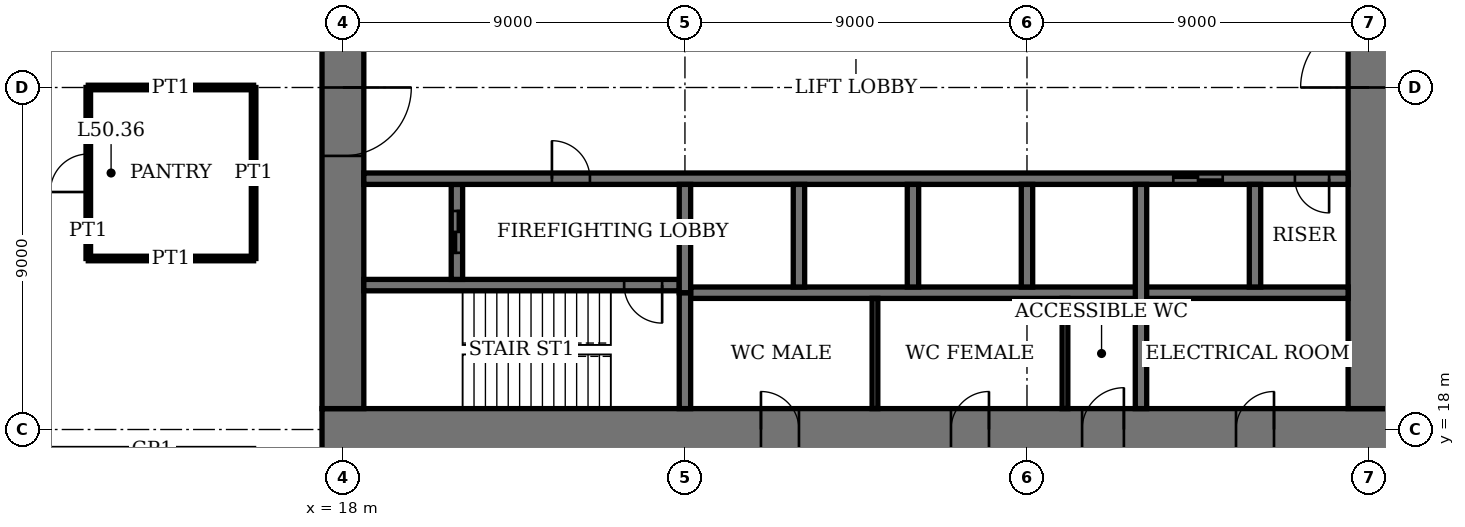
"""IFC4 building model, lengths in metres.
Left out: names, types, materials, properties, quantities, classifications, styles, units other than length and angle.
Written with IfcOpenShell. Run it as: python <this file> out.ifc"""

import sys

from ifc_helpers import new_model, si_unit, direction, frame, frame_2d, origin, place, context, subcontext, project, spatial, rectangle, extrude, element, fill, save


model = new_model("IFC4")
c1 = context("Model", 3, precision=1e-05, world=origin(), true_north=direction((0.0, 1.0)))
c2 = subcontext(c1, "Body", "Model", "MODEL_VIEW")
j1 = project(units=[si_unit("LENGTHUNIT", "METRE"), si_unit("PLANEANGLEUNIT", "RADIAN")], contexts=[c1])
p1 = place(None, origin())
s1 = spatial("IfcSite", under=j1, at=p1, CompositionType="ELEMENT")
p2 = place(p1, origin())
s2 = spatial("IfcBuilding", under=s1, at=p2, CompositionType="ELEMENT")
p3 = place(p2, frame((0.0, 0.0, 206.2)))
s3 = spatial("IfcBuildingStorey", under=s2, at=p3, CompositionType="ELEMENT", Elevation=206.2)
p4 = place(p3, frame((17.45, 18.0, 0.0), z_axis=(0.0, 0.0, 1.0), x_axis=(1.0, 0.0, 0.0)))
e1 = element("IfcWall", 1, at=p4, inside=s3, PredefinedType="SHEAR", context=c2, shape_type="SweptSolid", body=[
    extrude(rectangle(XDim=28.1, YDim=1.1, at=frame_2d((14.05, 0.0))), origin(), (0.0, 0.0, 1.0), 4.0),
])
p5 = place(p4, frame((11.55, 0.0, 0.0)))
e2 = element("IfcOpeningElement", 2, at=p5, cuts=e1, PredefinedType="OPENING", context=c2, shape_type="SweptSolid", body=[
    extrude(rectangle(XDim=1.0, YDim=2.4, at=frame_2d((0.5, 1.2))), frame((0.0, 0.56, 0.0), z_axis=(0.0, -1.0, 0.0), x_axis=(1.0, 0.0, 0.0)), (0.0, 0.0, 1.0), 1.12),
])
p6 = place(p4, frame((16.55, 0.0, 0.0)))
e3 = element("IfcOpeningElement", 3, at=p6, cuts=e1, PredefinedType="OPENING", context=c2, shape_type="SweptSolid", body=[
    extrude(rectangle(XDim=1.0, YDim=2.4, at=frame_2d((0.5, 1.2))), frame((0.0, 0.56, 0.0), z_axis=(0.0, -1.0, 0.0), x_axis=(1.0, 0.0, 0.0)), (0.0, 0.0, 1.0), 1.12),
])
p7 = place(p4, frame((20.0, 0.0, 0.0)))
e4 = element("IfcOpeningElement", 4, at=p7, cuts=e1, PredefinedType="OPENING", context=c2, shape_type="SweptSolid", body=[
    extrude(rectangle(XDim=1.1, YDim=2.4, at=frame_2d((0.55, 1.2))), frame((0.0, 0.56, 0.0), z_axis=(0.0, -1.0, 0.0), x_axis=(1.0, 0.0, 0.0)), (0.0, 0.0, 1.0), 1.12),
])
p8 = place(p4, frame((24.05, 0.0, 0.0)))
e5 = element("IfcOpeningElement", 5, at=p8, cuts=e1, PredefinedType="OPENING", context=c2, shape_type="SweptSolid", body=[
    extrude(rectangle(XDim=1.0, YDim=2.4, at=frame_2d((0.5, 1.2))), frame((0.0, 0.56, 0.0), z_axis=(0.0, -1.0, 0.0), x_axis=(1.0, 0.0, 0.0)), (0.0, 0.0, 1.0), 1.12),
])
p9 = place(p3, frame((18.0, 35.45, 0.0), z_axis=(0.0, 0.0, 1.0), x_axis=(0.0, -1.0, 0.0)))
e6 = element("IfcWall", 6, at=p9, inside=s3, PredefinedType="SHEAR", context=c2, shape_type="SweptSolid", body=[
    extrude(rectangle(XDim=16.9, YDim=1.1, at=frame_2d((8.45, 0.0))), origin(), (0.0, 0.0, 1.0), 4.0),
])
p10 = place(p9, frame((8.45, 0.0, 0.0)))
e7 = element("IfcOpeningElement", 7, at=p10, cuts=e6, PredefinedType="OPENING", context=c2, shape_type="SweptSolid", body=[
    extrude(rectangle(XDim=1.8, YDim=2.4, at=frame_2d((0.9, 1.2))), frame((0.0, 0.56, 0.0), z_axis=(0.0, -1.0, 0.0), x_axis=(1.0, 0.0, 0.0)), (0.0, 0.0, 1.0), 1.12),
])
p11 = place(p3, frame((45.0, 18.55, 0.0), z_axis=(0.0, 0.0, 1.0), x_axis=(0.0, 1.0, 0.0)))
e8 = element("IfcWall", 8, at=p11, inside=s3, PredefinedType="SHEAR", context=c2, shape_type="SweptSolid", body=[
    extrude(rectangle(XDim=16.9, YDim=1.1, at=frame_2d((8.45, 0.0))), origin(), (0.0, 0.0, 1.0), 4.0),
])
p12 = place(p11, frame((8.45, 0.0, 0.0)))
e9 = element("IfcOpeningElement", 9, at=p12, cuts=e8, PredefinedType="OPENING", context=c2, shape_type="SweptSolid", body=[
    extrude(rectangle(XDim=1.8, YDim=2.4, at=frame_2d((0.9, 1.2))), frame((0.0, 0.56, 0.0), z_axis=(0.0, -1.0, 0.0), x_axis=(1.0, 0.0, 0.0)), (0.0, 0.0, 1.0), 1.12),
])
p13 = place(p3, frame((18.55, 21.8, 0.0), z_axis=(0.0, 0.0, 1.0), x_axis=(1.0, 0.0, 0.0)))
e10 = element("IfcWall", 10, at=p13, inside=s3, PredefinedType="SHEAR", context=c2, shape_type="SweptSolid", body=[
    extrude(rectangle(XDim=8.3, YDim=0.3, at=frame_2d((4.15, 0.0))), origin(), (0.0, 0.0, 1.0), 4.0),
])
p14 = place(p13, frame((6.85, 0.0, 0.0)))
e11 = element("IfcOpeningElement", 11, at=p14, cuts=e10, PredefinedType="OPENING", context=c2, shape_type="SweptSolid", body=[
    extrude(rectangle(XDim=1.0, YDim=2.4, at=frame_2d((0.5, 1.2))), frame((0.0, 0.16, 0.0), z_axis=(0.0, -1.0, 0.0), x_axis=(1.0, 0.0, 0.0)), (0.0, 0.0, 1.0), 0.32),
])
p15 = place(p3, frame((27.0, 18.55, 0.0), z_axis=(0.0, 0.0, 1.0), x_axis=(0.0, 1.0, 0.0)))
e12 = element("IfcWall", 12, at=p15, inside=s3, PredefinedType="SHEAR", context=c2, shape_type="SweptSolid", body=[
    extrude(rectangle(XDim=3.05, YDim=0.3, at=frame_2d((1.525, 0.0))), origin(), (0.0, 0.0, 1.0), 4.0),
])
p16 = place(p3, frame((21.0, 21.95, 0.0), z_axis=(0.0, 0.0, 1.0), x_axis=(0.0, 1.0, 0.0)))
e13 = element("IfcWall", 13, at=p16, inside=s3, PredefinedType="SHEAR", context=c2, shape_type="SweptSolid", body=[
    extrude(rectangle(XDim=2.5, YDim=0.3, at=frame_2d((1.25, 0.0))), origin(), (0.0, 0.0, 1.0), 4.0),
])
p17 = place(p16, frame((0.7, 0.0, 0.0)))
e14 = element("IfcOpeningElement", 14, at=p17, cuts=e13, PredefinedType="OPENING", context=c2, shape_type="SweptSolid", body=[
    extrude(rectangle(XDim=1.1, YDim=2.4, at=frame_2d((0.55, 1.2))), frame((0.0, 0.16, 0.0), z_axis=(0.0, -1.0, 0.0), x_axis=(1.0, 0.0, 0.0)), (0.0, 0.0, 1.0), 0.32),
])
p18 = place(p3, frame((18.55, 24.6, 0.0), z_axis=(0.0, 0.0, 1.0), x_axis=(1.0, 0.0, 0.0)))
e15 = element("IfcWall", 15, at=p18, inside=s3, PredefinedType="SHEAR", context=c2, shape_type="SweptSolid", body=[
    extrude(rectangle(XDim=25.9, YDim=0.3, at=frame_2d((12.95, 0.0))), origin(), (0.0, 0.0, 1.0), 4.0),
])
p19 = place(p18, frame((4.95, 0.0, 0.0)))
e16 = element("IfcOpeningElement", 16, at=p19, cuts=e15, PredefinedType="OPENING", context=c2, shape_type="SweptSolid", body=[
    extrude(rectangle(XDim=1.0, YDim=2.4, at=frame_2d((0.5, 1.2))), frame((0.0, 0.16, 0.0), z_axis=(0.0, -1.0, 0.0), x_axis=(1.0, 0.0, 0.0)), (0.0, 0.0, 1.0), 0.32),
])
p20 = place(p18, frame((24.5, 0.0, 0.0)))
e17 = element("IfcOpeningElement", 17, at=p20, cuts=e15, PredefinedType="OPENING", context=c2, shape_type="SweptSolid", body=[
    extrude(rectangle(XDim=0.9, YDim=2.1, at=frame_2d((0.45, 1.05))), frame((0.0, 0.16, 0.0), z_axis=(0.0, -1.0, 0.0), x_axis=(1.0, 0.0, 0.0)), (0.0, 0.0, 1.0), 0.32),
])
p21 = place(p18, frame((21.3, 0.0, 0.0)))
e18 = element("IfcOpeningElement", 18, at=p21, cuts=e15, PredefinedType="OPENING", context=c2, shape_type="SweptSolid", body=[
    extrude(rectangle(XDim=1.3, YDim=2.4, at=frame_2d((0.65, 1.2))), frame((0.0, 0.16, 0.0), z_axis=(0.0, -1.0, 0.0), x_axis=(1.0, 0.0, 0.0)), (0.0, 0.0, 1.0), 0.32),
])
p22 = place(p3, frame((27.15, 21.6, 0.0), z_axis=(0.0, 0.0, 1.0), x_axis=(1.0, 0.0, 0.0)))
e19 = element("IfcWall", 19, at=p22, inside=s3, PredefinedType="SHEAR", context=c2, shape_type="SweptSolid", body=[
    extrude(rectangle(XDim=17.3, YDim=0.3, at=frame_2d((8.65, 0.0))), origin(), (0.0, 0.0, 1.0), 4.0),
])
for number, where, z_axis, x_axis in (
    (20, (30.0, 21.75, 0.0), (0.0, 0.0, 1.0), (0.0, 1.0, 0.0)),
    (21, (33.0, 21.75, 0.0), (0.0, 0.0, 1.0), (0.0, 1.0, 0.0)),
    (22, (36.0, 21.75, 0.0), (0.0, 0.0, 1.0), (0.0, 1.0, 0.0)),
):
    element("IfcWall", number, at=place(p3, frame(where, z_axis=z_axis, x_axis=x_axis)), inside=s3, PredefinedType="SHEAR", context=c2, shape_type="SweptSolid", body=[
        extrude(rectangle(XDim=2.7, YDim=0.3, at=frame_2d((1.35, 0.0))), origin(), (0.0, 0.0, 1.0), 4.0),
    ])
p23 = place(p3, frame((39.0, 18.55, 0.0), z_axis=(0.0, 0.0, 1.0), x_axis=(0.0, 1.0, 0.0)))
e23 = element("IfcWall", 23, at=p23, inside=s3, PredefinedType="SHEAR", context=c2, shape_type="SweptSolid", body=[
    extrude(rectangle(XDim=5.9, YDim=0.3, at=frame_2d((2.95, 0.0))), origin(), (0.0, 0.0, 1.0), 4.0),
])
p24 = place(p3, frame((42.0, 21.75, 0.0), z_axis=(0.0, 0.0, 1.0), x_axis=(0.0, 1.0, 0.0)))
e24 = element("IfcWall", 24, at=p24, inside=s3, PredefinedType="SHEAR", context=c2, shape_type="SweptSolid", body=[
    extrude(rectangle(XDim=2.7, YDim=0.3, at=frame_2d((1.35, 0.0))), origin(), (0.0, 0.0, 1.0), 4.0),
])
p25 = place(p3, frame((27.0, 21.6, 0.0), z_axis=(0.0, 0.0, 1.0), x_axis=(0.0, 1.0, 0.0)))
e25 = element("IfcWall", 25, at=p25, inside=s3, PredefinedType="SHEAR", context=c2, shape_type="SweptSolid", body=[
    extrude(rectangle(XDim=2.85, YDim=0.3, at=frame_2d((1.425, 0.0))), origin(), (0.0, 0.0, 1.0), 4.0),
])
p26 = place(p3, frame((11.3, 22.5, 0.0), z_axis=(0.0, 0.0, 1.0), x_axis=(1.0, 0.0, 0.0)))
e26 = element("IfcWall", 26, at=p26, inside=s3, PredefinedType="PARTITIONING", context=c2, shape_type="SweptSolid", body=[
    extrude(rectangle(XDim=4.35, YDim=0.12, at=frame_2d((2.175, 0.0))), origin(), (0.0, 0.0, 1.0), 3.1),
])
p27 = place(p3, frame((11.3, 27.0, 0.0), z_axis=(0.0, 0.0, 1.0), x_axis=(1.0, 0.0, 0.0)))
e27 = element("IfcWall", 27, at=p27, inside=s3, PredefinedType="PARTITIONING", context=c2, shape_type="SweptSolid", body=[
    extrude(rectangle(XDim=4.35, YDim=0.12, at=frame_2d((2.175, 0.0))), origin(), (0.0, 0.0, 1.0), 3.05),
])
p28 = place(p3, frame((11.3, 22.5, 0.0), z_axis=(0.0, 0.0, 1.0), x_axis=(0.0, 1.0, 0.0)))
e28 = element("IfcWall", 28, at=p28, inside=s3, PredefinedType="PARTITIONING", context=c2, shape_type="SweptSolid", body=[
    extrude(rectangle(XDim=4.5, YDim=0.12, at=frame_2d((2.25, 0.0))), origin(), (0.0, 0.0, 1.0), 3.75),
])
p29 = place(p28, frame((1.75, 0.0, 0.0)))
e29 = element("IfcOpeningElement", 29, at=p29, cuts=e28, PredefinedType="OPENING", context=c2, shape_type="SweptSolid", body=[
    extrude(rectangle(XDim=1.0, YDim=2.4, at=frame_2d((0.5, 1.2))), frame((0.0, 0.07, 0.0), z_axis=(0.0, -1.0, 0.0), x_axis=(1.0, 0.0, 0.0)), (0.0, 0.0, 1.0), 0.14),
])
p30 = place(p3, frame((15.65, 22.5, 0.0), z_axis=(0.0, 0.0, 1.0), x_axis=(0.0, 1.0, 0.0)))
e30 = element("IfcWall", 30, at=p30, inside=s3, PredefinedType="PARTITIONING", context=c2, shape_type="SweptSolid", body=[
    extrude(rectangle(XDim=4.5, YDim=0.12, at=frame_2d((2.25, 0.0))), origin(), (0.0, 0.0, 1.0), 3.75),
])
for number, where, z_axis, x_axis in (
    (31, (32.0, 18.55, 0.0), (0.0, 0.0, 1.0), (0.0, 1.0, 0.0)),
    (32, (37.0, 18.55, 0.0), (0.0, 0.0, 1.0), (0.0, 1.0, 0.0)),
):
    element("IfcWall", number, at=place(p3, frame(where, z_axis=z_axis, x_axis=x_axis)), inside=s3, PredefinedType="PARTITIONING", context=c2, shape_type="SweptSolid", body=[
        extrude(rectangle(XDim=2.9, YDim=0.15, at=frame_2d((1.45, 0.0))), origin(), (0.0, 0.0, 1.0), 3.75),
    ])
p31 = place(p10, origin())
e33 = element("IfcDoor", 33, at=p31, inside=s3, OperationType="DOUBLE_DOOR_DOUBLE_SWING", PredefinedType="DOOR", context=c2, shape_type="SweptSolid", body=[
    extrude(rectangle(XDim=1.8, YDim=2.4, at=frame_2d((0.9, 1.2))), frame((0.0, 0.03, 0.0), z_axis=(0.0, -1.0, 0.0), x_axis=(1.0, 0.0, 0.0)), (0.0, 0.0, 1.0), 0.06),
    extrude(rectangle(XDim=0.04, YDim=2.4, at=frame_2d((0.02, 1.2))), frame((0.0, 0.55, 0.0), z_axis=(0.0, -1.0, 0.0), x_axis=(1.0, 0.0, 0.0)), (0.0, 0.0, 1.0), 1.1),
    extrude(rectangle(XDim=0.04, YDim=2.4, at=frame_2d((1.78, 1.2))), frame((0.0, 0.55, 0.0), z_axis=(0.0, -1.0, 0.0), x_axis=(1.0, 0.0, 0.0)), (0.0, 0.0, 1.0), 1.1),
    extrude(rectangle(XDim=1.8, YDim=0.04, at=frame_2d((0.9, 2.38))), frame((0.0, 0.55, 0.0), z_axis=(0.0, -1.0, 0.0), x_axis=(1.0, 0.0, 0.0)), (0.0, 0.0, 1.0), 1.1),
])
fill(e7, e33)
p32 = place(p12, origin())
e34 = element("IfcDoor", 34, at=p32, inside=s3, OperationType="DOUBLE_DOOR_DOUBLE_SWING", PredefinedType="DOOR", context=c2, shape_type="SweptSolid", body=[
    extrude(rectangle(XDim=1.8, YDim=2.4, at=frame_2d((0.9, 1.2))), frame((0.0, 0.03, 0.0), z_axis=(0.0, -1.0, 0.0), x_axis=(1.0, 0.0, 0.0)), (0.0, 0.0, 1.0), 0.06),
    extrude(rectangle(XDim=0.04, YDim=2.4, at=frame_2d((0.02, 1.2))), frame((0.0, 0.55, 0.0), z_axis=(0.0, -1.0, 0.0), x_axis=(1.0, 0.0, 0.0)), (0.0, 0.0, 1.0), 1.1),
    extrude(rectangle(XDim=0.04, YDim=2.4, at=frame_2d((1.78, 1.2))), frame((0.0, 0.55, 0.0), z_axis=(0.0, -1.0, 0.0), x_axis=(1.0, 0.0, 0.0)), (0.0, 0.0, 1.0), 1.1),
    extrude(rectangle(XDim=1.8, YDim=0.04, at=frame_2d((0.9, 2.38))), frame((0.0, 0.55, 0.0), z_axis=(0.0, -1.0, 0.0), x_axis=(1.0, 0.0, 0.0)), (0.0, 0.0, 1.0), 1.1),
])
fill(e9, e34)
p33 = place(p5, origin())
e35 = element("IfcDoor", 35, at=p33, inside=s3, OperationType="SINGLE_SWING_RIGHT", PredefinedType="DOOR", context=c2, shape_type="SweptSolid", body=[
    extrude(rectangle(XDim=1.0, YDim=2.4, at=frame_2d((0.5, 1.2))), frame((0.0, 0.025, 0.0), z_axis=(0.0, -1.0, 0.0), x_axis=(1.0, 0.0, 0.0)), (0.0, 0.0, 1.0), 0.05),
    extrude(rectangle(XDim=0.04, YDim=2.4, at=frame_2d((0.02, 1.2))), frame((0.0, 0.4, 0.0), z_axis=(0.0, -1.0, 0.0), x_axis=(1.0, 0.0, 0.0)), (0.0, 0.0, 1.0), 0.8),
    extrude(rectangle(XDim=0.04, YDim=2.4, at=frame_2d((0.98, 1.2))), frame((0.0, 0.4, 0.0), z_axis=(0.0, -1.0, 0.0), x_axis=(1.0, 0.0, 0.0)), (0.0, 0.0, 1.0), 0.8),
    extrude(rectangle(XDim=1.0, YDim=0.04, at=frame_2d((0.5, 2.38))), frame((0.0, 0.4, 0.0), z_axis=(0.0, -1.0, 0.0), x_axis=(1.0, 0.0, 0.0)), (0.0, 0.0, 1.0), 0.8),
])
fill(e2, e35)
p34 = place(p6, origin())
e36 = element("IfcDoor", 36, at=p34, inside=s3, OperationType="SINGLE_SWING_LEFT", PredefinedType="DOOR", context=c2, shape_type="SweptSolid", body=[
    extrude(rectangle(XDim=1.0, YDim=2.4, at=frame_2d((0.5, 1.2))), frame((0.0, 0.025, 0.0), z_axis=(0.0, -1.0, 0.0), x_axis=(1.0, 0.0, 0.0)), (0.0, 0.0, 1.0), 0.05),
    extrude(rectangle(XDim=0.04, YDim=2.4, at=frame_2d((0.02, 1.2))), frame((0.0, 0.4, 0.0), z_axis=(0.0, -1.0, 0.0), x_axis=(1.0, 0.0, 0.0)), (0.0, 0.0, 1.0), 0.8),
    extrude(rectangle(XDim=0.04, YDim=2.4, at=frame_2d((0.98, 1.2))), frame((0.0, 0.4, 0.0), z_axis=(0.0, -1.0, 0.0), x_axis=(1.0, 0.0, 0.0)), (0.0, 0.0, 1.0), 0.8),
    extrude(rectangle(XDim=1.0, YDim=0.04, at=frame_2d((0.5, 2.38))), frame((0.0, 0.4, 0.0), z_axis=(0.0, -1.0, 0.0), x_axis=(1.0, 0.0, 0.0)), (0.0, 0.0, 1.0), 0.8),
])
fill(e3, e36)
p35 = place(p7, origin())
e37 = element("IfcDoor", 37, at=p35, inside=s3, OperationType="SINGLE_SWING_LEFT", PredefinedType="DOOR", context=c2, shape_type="SweptSolid", body=[
    extrude(rectangle(XDim=1.1, YDim=2.4, at=frame_2d((0.55, 1.2))), frame((0.0, 0.025, 0.0), z_axis=(0.0, -1.0, 0.0), x_axis=(1.0, 0.0, 0.0)), (0.0, 0.0, 1.0), 0.05),
    extrude(rectangle(XDim=0.04, YDim=2.4, at=frame_2d((0.02, 1.2))), frame((0.0, 0.44, 0.0), z_axis=(0.0, -1.0, 0.0), x_axis=(1.0, 0.0, 0.0)), (0.0, 0.0, 1.0), 0.88),
    extrude(rectangle(XDim=0.04, YDim=2.4, at=frame_2d((1.08, 1.2))), frame((0.0, 0.44, 0.0), z_axis=(0.0, -1.0, 0.0), x_axis=(1.0, 0.0, 0.0)), (0.0, 0.0, 1.0), 0.88),
    extrude(rectangle(XDim=1.1, YDim=0.04, at=frame_2d((0.55, 2.38))), frame((0.0, 0.44, 0.0), z_axis=(0.0, -1.0, 0.0), x_axis=(1.0, 0.0, 0.0)), (0.0, 0.0, 1.0), 0.88),
])
fill(e4, e37)
p36 = place(p8, origin())
e38 = element("IfcDoor", 38, at=p36, inside=s3, OperationType="SINGLE_SWING_LEFT", PredefinedType="DOOR", context=c2, shape_type="SweptSolid", body=[
    extrude(rectangle(XDim=1.0, YDim=2.4, at=frame_2d((0.5, 1.2))), frame((0.0, 0.025, 0.0), z_axis=(0.0, -1.0, 0.0), x_axis=(1.0, 0.0, 0.0)), (0.0, 0.0, 1.0), 0.05),
    extrude(rectangle(XDim=0.04, YDim=2.4, at=frame_2d((0.02, 1.2))), frame((0.0, 0.4, 0.0), z_axis=(0.0, -1.0, 0.0), x_axis=(1.0, 0.0, 0.0)), (0.0, 0.0, 1.0), 0.8),
    extrude(rectangle(XDim=0.04, YDim=2.4, at=frame_2d((0.98, 1.2))), frame((0.0, 0.4, 0.0), z_axis=(0.0, -1.0, 0.0), x_axis=(1.0, 0.0, 0.0)), (0.0, 0.0, 1.0), 0.8),
    extrude(rectangle(XDim=1.0, YDim=0.04, at=frame_2d((0.5, 2.38))), frame((0.0, 0.4, 0.0), z_axis=(0.0, -1.0, 0.0), x_axis=(1.0, 0.0, 0.0)), (0.0, 0.0, 1.0), 0.8),
])
fill(e5, e38)
p37 = place(p14, origin())
e39 = element("IfcDoor", 39, at=p37, inside=s3, OperationType="SINGLE_SWING_RIGHT", PredefinedType="DOOR", context=c2, shape_type="SweptSolid", body=[
    extrude(rectangle(XDim=1.0, YDim=2.4, at=frame_2d((0.5, 1.2))), frame((0.0, 0.03, 0.0), z_axis=(0.0, -1.0, 0.0), x_axis=(1.0, 0.0, 0.0)), (0.0, 0.0, 1.0), 0.06),
])
fill(e11, e39)
p38 = place(p19, origin())
e40 = element("IfcDoor", 40, at=p38, inside=s3, OperationType="SINGLE_SWING_RIGHT", PredefinedType="DOOR", context=c2, shape_type="SweptSolid", body=[
    extrude(rectangle(XDim=1.0, YDim=2.4, at=frame_2d((0.5, 1.2))), frame((0.0, 0.03, 0.0), z_axis=(0.0, -1.0, 0.0), x_axis=(1.0, 0.0, 0.0)), (0.0, 0.0, 1.0), 0.06),
])
fill(e16, e40)
p39 = place(p20, origin())
e41 = element("IfcDoor", 41, at=p39, inside=s3, OperationType="SINGLE_SWING_RIGHT", PredefinedType="DOOR", context=c2, shape_type="SweptSolid", body=[
    extrude(rectangle(XDim=0.9, YDim=2.1, at=frame_2d((0.45, 1.05))), frame((0.0, 0.03, 0.0), z_axis=(0.0, -1.0, 0.0), x_axis=(1.0, 0.0, 0.0)), (0.0, 0.0, 1.0), 0.06),
])
fill(e17, e41)
p40 = place(p29, origin())
e42 = element("IfcDoor", 42, at=p40, inside=s3, OperationType="SINGLE_SWING_RIGHT", PredefinedType="DOOR", context=c2, shape_type="SweptSolid", body=[
    extrude(rectangle(XDim=1.0, YDim=2.4, at=frame_2d((0.5, 1.2))), frame((0.0, 0.025, 0.0), z_axis=(0.0, -1.0, 0.0), x_axis=(1.0, 0.0, 0.0)), (0.0, 0.0, 1.0), 0.05),
])
fill(e29, e42)
p41 = place(p21, origin())
e43 = element("IfcDoor", 43, at=p41, inside=s3, OperationType="DOUBLE_DOOR_SLIDING", PredefinedType="DOOR", context=c2, shape_type="SweptSolid", body=[
    extrude(rectangle(XDim=1.3, YDim=2.4, at=frame_2d((0.65, 1.2))), frame((0.0, 0.02, 0.0), z_axis=(0.0, -1.0, 0.0), x_axis=(1.0, 0.0, 0.0)), (0.0, 0.0, 1.0), 0.04),
])
fill(e18, e43)
p42 = place(p17, origin())
e44 = element("IfcDoor", 44, at=p42, inside=s3, OperationType="DOUBLE_DOOR_SLIDING", PredefinedType="DOOR", context=c2, shape_type="SweptSolid", body=[
    extrude(rectangle(XDim=1.1, YDim=2.4, at=frame_2d((0.55, 1.2))), frame((0.0, 0.03, 0.0), z_axis=(0.0, -1.0, 0.0), x_axis=(1.0, 0.0, 0.0)), (0.0, 0.0, 1.0), 0.06),
])
fill(e14, e44)
save(model, sys.argv[1])
